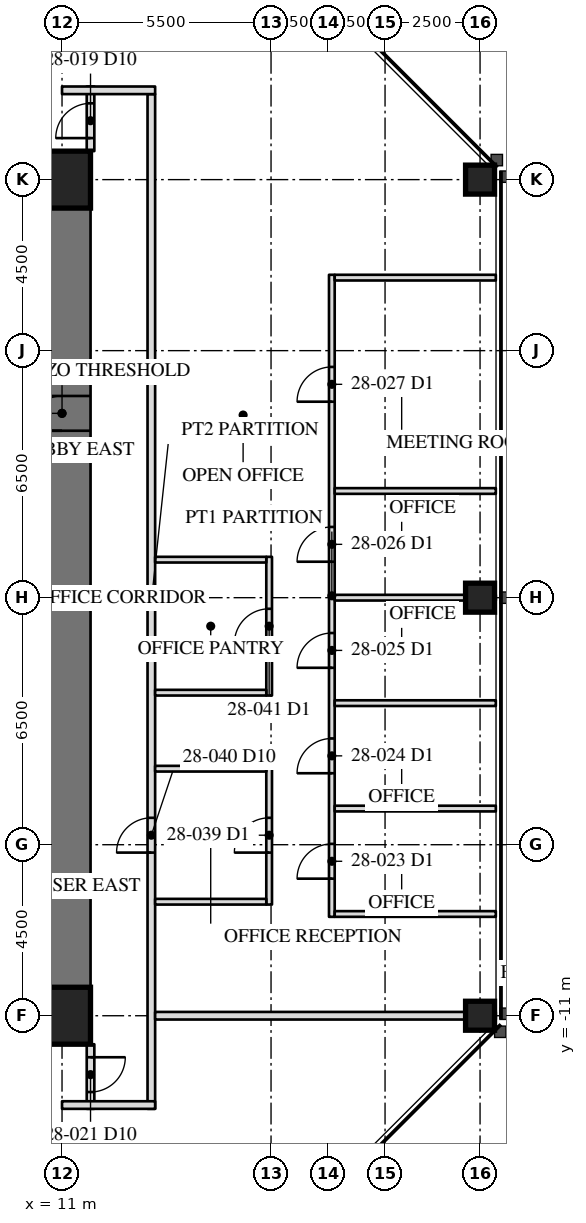
"""IFC4 building model, lengths in metres.
Left out: names, types, materials, properties, quantities, classifications, styles, units other than length and angle.
Written with IfcOpenShell. Run it as: python <this file> out.ifc"""

import sys

from ifc_helpers import new_model, si_unit, direction, frame, frame_2d, origin, origin_2d, place, context, subcontext, project, spatial, rectangle, hollow_rectangle, extrude, element, fill, save


model = new_model("IFC4")
c1 = context("Model", 3, precision=1e-05, world=origin(), true_north=direction((0.0, 1.0)))
c2 = subcontext(c1, "Body", "Model", "MODEL_VIEW")
j1 = project(units=[si_unit("LENGTHUNIT", "METRE"), si_unit("PLANEANGLEUNIT", "RADIAN")], contexts=[c1])
p1 = place(None, origin())
s1 = spatial("IfcSite", under=j1, at=p1, CompositionType="ELEMENT")
p2 = place(p1, origin())
s2 = spatial("IfcBuilding", under=s1, at=p2, CompositionType="ELEMENT")
p3 = place(p2, frame((0.0, 0.0, 121.3)))
s3 = spatial("IfcBuildingStorey", under=s2, at=p3, CompositionType="ELEMENT", Elevation=121.3)
for number, where, z_axis, x_axis in (
    (1, (22.0, -11.0, 0.0), (0.0, 0.0, 1.0), (0.0, 1.0, 0.0)),
    (2, (22.0, 0.0, 0.0), (0.0, 0.0, 1.0), (0.0, 1.0, 0.0)),
    (3, (22.0, 11.0, 0.0), (0.0, 0.0, 1.0), (0.0, 1.0, 0.0)),
):
    element("IfcColumn", number, at=place(p3, frame(where, z_axis=z_axis, x_axis=x_axis)), inside=s3, PredefinedType="COLUMN", context=c2, shape_type="SweptSolid", body=[
        extrude(hollow_rectangle(XDim=0.762, YDim=0.762, WallThickness=0.127, at=origin_2d()), origin(), (0.0, 0.0, 1.0), 4.1),
    ])
p4 = place(p3, frame((11.0, -11.0, 0.0), z_axis=(0.0, 0.0, 1.0), x_axis=(0.0, 1.0, 0.0)))
e4 = element("IfcWall", 4, at=p4, inside=s3, PredefinedType="SHEAR", context=c2, shape_type="SweptSolid", body=[
    extrude(rectangle(XDim=22.0, YDim=1.5, at=frame_2d((11.0, 0.0))), origin(), (0.0, 0.0, 1.0), 4.1),
])
p5 = place(p4, frame((15.393, 0.0, 0.0)))
e5 = element("IfcOpeningElement", 5, at=p5, cuts=e4, PredefinedType="OPENING", context=c2, shape_type="SweptSolid", body=[
    extrude(rectangle(XDim=0.915, YDim=2.134, at=frame_2d((0.458, 1.067))), frame((0.0, 0.76, 0.0), z_axis=(0.0, -1.0, 0.0), x_axis=(1.0, 0.0, 0.0)), (0.0, 0.0, 1.0), 1.52),
])
for number, where, z_axis, x_axis in (
    (6, (11.0, 11.0, 0.0), (0.0, 0.0, 1.0), (-1.0, 0.0, 0.0)),
    (7, (6.5, -11.0, 0.0), (0.0, 0.0, 1.0), (1.0, 0.0, 0.0)),
):
    element("IfcWall", number, at=place(p3, frame(where, z_axis=z_axis, x_axis=x_axis)), inside=s3, PredefinedType="SHEAR", context=c2, shape_type="SweptSolid", body=[
        extrude(rectangle(XDim=4.5, YDim=1.5, at=frame_2d((2.25, 0.0))), origin(), (0.0, 0.0, 1.0), 4.1),
    ])
for number, where, z_axis, x_axis in (
    (8, (11.0, 11.0, 0.0), (0.0, 0.0, 1.0), (1.0, 0.0, 0.0)),
    (9, (11.0, -11.0, 0.0), (0.0, 0.0, 1.0), (1.0, 0.0, 0.0)),
):
    element("IfcColumn", number, at=place(p3, frame(where, z_axis=z_axis, x_axis=x_axis)), inside=s3, PredefinedType="COLUMN", context=c2, shape_type="SweptSolid", body=[
        extrude(hollow_rectangle(XDim=1.499, YDim=1.499, WallThickness=0.102, at=origin_2d()), origin(), (0.0, 0.0, 1.0), 4.1),
    ])
p6 = place(p3, frame((13.35, -13.45, 0.0), z_axis=(0.0, 0.0, 1.0), x_axis=(0.0, 1.0, 0.0)))
e10 = element("IfcWall", 10, at=p6, inside=s3, PredefinedType="PARTITIONING", context=c2, shape_type="SweptSolid", body=[
    extrude(rectangle(XDim=26.7, YDim=0.2, at=frame_2d((13.35, 0.0))), origin(), (0.0, 0.0, 1.0), 3.91),
])
p7 = place(p6, frame((6.742, 0.0, 0.0)))
e11 = element("IfcOpeningElement", 11, at=p7, cuts=e10, PredefinedType="OPENING", context=c2, shape_type="SweptSolid", body=[
    extrude(rectangle(XDim=0.915, YDim=2.134, at=frame_2d((0.458, 1.067))), frame((0.0, 0.11, 0.0), z_axis=(0.0, -1.0, 0.0), x_axis=(1.0, 0.0, 0.0)), (0.0, 0.0, 1.0), 0.22),
])
p8 = place(p3, frame((11.75, 11.75, 0.0), z_axis=(0.0, 0.0, 1.0), x_axis=(0.0, 1.0, 0.0)))
e12 = element("IfcWall", 12, at=p8, inside=s3, PredefinedType="PARTITIONING", context=c2, shape_type="SweptSolid", body=[
    extrude(rectangle(XDim=1.7, YDim=0.2, at=frame_2d((0.85, 0.0))), origin(), (0.0, 0.0, 1.0), 3.91),
])
p9 = place(p8, frame((0.343, 0.0, 0.0)))
e13 = element("IfcOpeningElement", 13, at=p9, cuts=e12, PredefinedType="OPENING", context=c2, shape_type="SweptSolid", body=[
    extrude(rectangle(XDim=0.915, YDim=2.134, at=frame_2d((0.458, 1.067))), frame((0.0, 0.11, 0.0), z_axis=(0.0, -1.0, 0.0), x_axis=(1.0, 0.0, 0.0)), (0.0, 0.0, 1.0), 0.22),
])
p10 = place(p3, frame((11.0, 13.35, 0.0), z_axis=(0.0, 0.0, 1.0), x_axis=(1.0, 0.0, 0.0)))
e14 = element("IfcWall", 14, at=p10, inside=s3, PredefinedType="PARTITIONING", context=c2, shape_type="SweptSolid", body=[
    extrude(rectangle(XDim=2.45, YDim=0.2, at=frame_2d((1.225, 0.0))), origin(), (0.0, 0.0, 1.0), 3.91),
])
p11 = place(p3, frame((11.75, -11.75, 0.0), z_axis=(0.0, 0.0, 1.0), x_axis=(0.0, -1.0, 0.0)))
e15 = element("IfcWall", 15, at=p11, inside=s3, PredefinedType="PARTITIONING", context=c2, shape_type="SweptSolid", body=[
    extrude(rectangle(XDim=1.7, YDim=0.2, at=frame_2d((0.85, 0.0))), origin(), (0.0, 0.0, 1.0), 3.91),
])
p12 = place(p11, frame((0.343, 0.0, 0.0)))
e16 = element("IfcOpeningElement", 16, at=p12, cuts=e15, PredefinedType="OPENING", context=c2, shape_type="SweptSolid", body=[
    extrude(rectangle(XDim=0.915, YDim=2.134, at=frame_2d((0.458, 1.067))), frame((0.0, 0.11, 0.0), z_axis=(0.0, -1.0, 0.0), x_axis=(1.0, 0.0, 0.0)), (0.0, 0.0, 1.0), 0.22),
])
p13 = place(p3, frame((11.0, -13.35, 0.0), z_axis=(0.0, 0.0, 1.0), x_axis=(1.0, 0.0, 0.0)))
e17 = element("IfcWall", 17, at=p13, inside=s3, PredefinedType="PARTITIONING", context=c2, shape_type="SweptSolid", body=[
    extrude(rectangle(XDim=2.45, YDim=0.2, at=frame_2d((1.225, 0.0))), origin(), (0.0, 0.0, 1.0), 3.91),
])
p14 = place(p3, frame((13.45, -11.0, 0.0), z_axis=(0.0, 0.0, 1.0), x_axis=(1.0, 0.0, 0.0)))
e18 = element("IfcWall", 18, at=p14, inside=s3, PredefinedType="PARTITIONING", context=c2, shape_type="SweptSolid", body=[
    extrude(rectangle(XDim=8.965, YDim=0.2, at=frame_2d((4.482, 0.0))), origin(), (0.0, 0.0, 1.0), 3.326),
])
p15 = place(p3, frame((18.1, -8.398, 0.0), z_axis=(0.0, 0.0, 1.0), x_axis=(0.0, 1.0, 0.0)))
e19 = element("IfcWall", 19, at=p15, inside=s3, PredefinedType="PARTITIONING", context=c2, shape_type="SweptSolid", body=[
    extrude(rectangle(XDim=16.894, YDim=0.15, at=frame_2d((8.447, 0.0))), origin(), (0.0, 0.0, 1.0), 3.91),
])
p16 = place(p15, frame((1.004, 0.0, 0.0)))
e20 = element("IfcOpeningElement", 20, at=p16, cuts=e19, PredefinedType="OPENING", context=c2, shape_type="SweptSolid", body=[
    extrude(rectangle(XDim=0.915, YDim=2.134, at=frame_2d((0.458, 1.067))), frame((0.0, 0.085, 0.0), z_axis=(0.0, -1.0, 0.0), x_axis=(1.0, 0.0, 0.0)), (0.0, 0.0, 1.0), 0.17),
])
p17 = place(p15, frame((3.779, 0.0, 0.0)))
e21 = element("IfcOpeningElement", 21, at=p17, cuts=e19, PredefinedType="OPENING", context=c2, shape_type="SweptSolid", body=[
    extrude(rectangle(XDim=0.915, YDim=2.134, at=frame_2d((0.458, 1.067))), frame((0.0, 0.085, 0.0), z_axis=(0.0, -1.0, 0.0), x_axis=(1.0, 0.0, 0.0)), (0.0, 0.0, 1.0), 0.17),
])
p18 = place(p15, frame((6.553, 0.0, 0.0)))
e22 = element("IfcOpeningElement", 22, at=p18, cuts=e19, PredefinedType="OPENING", context=c2, shape_type="SweptSolid", body=[
    extrude(rectangle(XDim=0.915, YDim=2.134, at=frame_2d((0.458, 1.067))), frame((0.0, 0.085, 0.0), z_axis=(0.0, -1.0, 0.0), x_axis=(1.0, 0.0, 0.0)), (0.0, 0.0, 1.0), 0.17),
])
p19 = place(p15, frame((9.344, 0.0, 0.0)))
e23 = element("IfcOpeningElement", 23, at=p19, cuts=e19, PredefinedType="OPENING", context=c2, shape_type="SweptSolid", body=[
    extrude(rectangle(XDim=0.915, YDim=2.134, at=frame_2d((0.458, 1.067))), frame((0.0, 0.085, 0.0), z_axis=(0.0, -1.0, 0.0), x_axis=(1.0, 0.0, 0.0)), (0.0, 0.0, 1.0), 0.17),
])
p20 = place(p15, frame((13.554, 0.0, 0.0)))
e24 = element("IfcOpeningElement", 24, at=p20, cuts=e19, PredefinedType="OPENING", context=c2, shape_type="SweptSolid", body=[
    extrude(rectangle(XDim=0.915, YDim=2.134, at=frame_2d((0.458, 1.067))), frame((0.0, 0.085, 0.0), z_axis=(0.0, -1.0, 0.0), x_axis=(1.0, 0.0, 0.0)), (0.0, 0.0, 1.0), 0.17),
])
for number, where, z_axis, x_axis in (
    (25, (18.175, -8.323, 0.0), (0.0, 0.0, 1.0), (1.0, 0.0, 0.0)),
    (26, (18.175, -5.549, 0.0), (0.0, 0.0, 1.0), (1.0, 0.0, 0.0)),
    (27, (18.175, -2.775, 0.0), (0.0, 0.0, 1.0), (1.0, 0.0, 0.0)),
):
    element("IfcWall", number, at=place(p3, frame(where, z_axis=z_axis, x_axis=x_axis)), inside=s3, PredefinedType="PARTITIONING", context=c2, shape_type="SweptSolid", body=[
        extrude(rectangle(XDim=4.24, YDim=0.15, at=frame_2d((2.12, 0.0))), origin(), (0.0, 0.0, 1.0), 3.91),
    ])
p21 = place(p3, frame((18.175, 0.0, 0.0), z_axis=(0.0, 0.0, 1.0), x_axis=(1.0, 0.0, 0.0)))
e28 = element("IfcWall", 28, at=p21, inside=s3, PredefinedType="PARTITIONING", context=c2, shape_type="SweptSolid", body=[
    extrude(rectangle(XDim=4.24, YDim=0.15, at=frame_2d((2.12, 0.0))), origin(), (0.0, 0.0, 1.0), 3.326),
])
for number, where, z_axis, x_axis in (
    (29, (18.175, 2.807, 0.0), (0.0, 0.0, 1.0), (1.0, 0.0, 0.0)),
    (30, (18.175, 8.421, 0.0), (0.0, 0.0, 1.0), (1.0, 0.0, 0.0)),
):
    element("IfcWall", number, at=place(p3, frame(where, z_axis=z_axis, x_axis=x_axis)), inside=s3, PredefinedType="PARTITIONING", context=c2, shape_type="SweptSolid", body=[
        extrude(rectangle(XDim=4.24, YDim=0.15, at=frame_2d((2.12, 0.0))), origin(), (0.0, 0.0, 1.0), 3.91),
    ])
p22 = place(p3, frame((16.45, -8.075, 0.0), z_axis=(0.0, 0.0, 1.0), x_axis=(0.0, 1.0, 0.0)))
e31 = element("IfcWall", 31, at=p22, inside=s3, PredefinedType="PARTITIONING", context=c2, shape_type="SweptSolid", body=[
    extrude(rectangle(XDim=3.65, YDim=0.15, at=frame_2d((1.825, 0.0))), origin(), (0.0, 0.0, 1.0), 3.91),
])
p23 = place(p22, frame((1.367, 0.0, 0.0)))
e32 = element("IfcOpeningElement", 32, at=p23, cuts=e31, PredefinedType="OPENING", context=c2, shape_type="SweptSolid", body=[
    extrude(rectangle(XDim=0.915, YDim=2.134, at=frame_2d((0.458, 1.067))), frame((0.0, 0.085, 0.0), z_axis=(0.0, -1.0, 0.0), x_axis=(1.0, 0.0, 0.0)), (0.0, 0.0, 1.0), 0.17),
])
for number, where, z_axis, x_axis in (
    (33, (16.375, -8.0, 0.0), (0.0, 0.0, 1.0), (-1.0, 0.0, 0.0)),
    (34, (16.375, -4.5, 0.0), (0.0, 0.0, 1.0), (-1.0, 0.0, 0.0)),
):
    element("IfcWall", number, at=place(p3, frame(where, z_axis=z_axis, x_axis=x_axis)), inside=s3, PredefinedType="PARTITIONING", context=c2, shape_type="SweptSolid", body=[
        extrude(rectangle(XDim=2.925, YDim=0.15, at=frame_2d((1.462, 0.0))), origin(), (0.0, 0.0, 1.0), 3.91),
    ])
p24 = place(p3, frame((16.45, -2.575, 0.0), z_axis=(0.0, 0.0, 1.0), x_axis=(0.0, 1.0, 0.0)))
e35 = element("IfcWall", 35, at=p24, inside=s3, PredefinedType="PARTITIONING", context=c2, shape_type="SweptSolid", body=[
    extrude(rectangle(XDim=3.65, YDim=0.15, at=frame_2d((1.825, 0.0))), origin(), (0.0, 0.0, 1.0), 3.91),
])
p25 = place(p24, frame((1.367, 0.0, 0.0)))
e36 = element("IfcOpeningElement", 36, at=p25, cuts=e35, PredefinedType="OPENING", context=c2, shape_type="SweptSolid", body=[
    extrude(rectangle(XDim=0.915, YDim=2.134, at=frame_2d((0.458, 1.067))), frame((0.0, 0.085, 0.0), z_axis=(0.0, -1.0, 0.0), x_axis=(1.0, 0.0, 0.0)), (0.0, 0.0, 1.0), 0.17),
])
for number, where, z_axis, x_axis in (
    (37, (16.375, -2.5, 0.0), (0.0, 0.0, 1.0), (-1.0, 0.0, 0.0)),
    (38, (16.375, 1.0, 0.0), (0.0, 0.0, 1.0), (-1.0, 0.0, 0.0)),
):
    element("IfcWall", number, at=place(p3, frame(where, z_axis=z_axis, x_axis=x_axis)), inside=s3, PredefinedType="PARTITIONING", context=c2, shape_type="SweptSolid", body=[
        extrude(rectangle(XDim=2.925, YDim=0.15, at=frame_2d((1.462, 0.0))), origin(), (0.0, 0.0, 1.0), 3.91),
    ])
p26 = place(p5, origin())
e39 = element("IfcDoor", 39, at=p26, inside=s3, OperationType="SINGLE_SWING_RIGHT", PredefinedType="DOOR", context=c2, shape_type="SweptSolid", body=[
    extrude(rectangle(XDim=0.915, YDim=2.134, at=frame_2d((0.458, 1.067))), frame((0.0, -0.675, 0.0), z_axis=(0.0, -1.0, 0.0), x_axis=(1.0, 0.0, 0.0)), (0.0, 0.0, 1.0), 0.05),
])
fill(e5, e39)
p27 = place(p9, origin())
e40 = element("IfcDoor", 40, at=p27, inside=s3, OperationType="SINGLE_SWING_LEFT", PredefinedType="DOOR", context=c2, shape_type="SweptSolid", body=[
    extrude(rectangle(XDim=0.915, YDim=2.134, at=frame_2d((0.458, 1.067))), frame((0.0, 0.025, 0.0), z_axis=(0.0, -1.0, 0.0), x_axis=(1.0, 0.0, 0.0)), (0.0, 0.0, 1.0), 0.05),
])
fill(e13, e40)
p28 = place(p12, origin())
e41 = element("IfcDoor", 41, at=p28, inside=s3, OperationType="SINGLE_SWING_LEFT", PredefinedType="DOOR", context=c2, shape_type="SweptSolid", body=[
    extrude(rectangle(XDim=0.915, YDim=2.134, at=frame_2d((0.458, 1.067))), frame((0.0, 0.025, 0.0), z_axis=(0.0, -1.0, 0.0), x_axis=(1.0, 0.0, 0.0)), (0.0, 0.0, 1.0), 0.05),
])
fill(e16, e41)
p29 = place(p16, origin())
e42 = element("IfcDoor", 42, at=p29, inside=s3, OperationType="SINGLE_SWING_LEFT", PredefinedType="DOOR", context=c2, shape_type="SweptSolid", body=[
    extrude(rectangle(XDim=0.915, YDim=2.134, at=frame_2d((0.458, 1.067))), frame((0.0, 0.025, 0.0), z_axis=(0.0, -1.0, 0.0), x_axis=(1.0, 0.0, 0.0)), (0.0, 0.0, 1.0), 0.05),
])
fill(e20, e42)
p30 = place(p17, origin())
e43 = element("IfcDoor", 43, at=p30, inside=s3, OperationType="SINGLE_SWING_LEFT", PredefinedType="DOOR", context=c2, shape_type="SweptSolid", body=[
    extrude(rectangle(XDim=0.915, YDim=2.134, at=frame_2d((0.458, 1.067))), frame((0.0, 0.025, 0.0), z_axis=(0.0, -1.0, 0.0), x_axis=(1.0, 0.0, 0.0)), (0.0, 0.0, 1.0), 0.05),
])
fill(e21, e43)
p31 = place(p18, origin())
e44 = element("IfcDoor", 44, at=p31, inside=s3, OperationType="SINGLE_SWING_LEFT", PredefinedType="DOOR", context=c2, shape_type="SweptSolid", body=[
    extrude(rectangle(XDim=0.915, YDim=2.134, at=frame_2d((0.458, 1.067))), frame((0.0, 0.025, 0.0), z_axis=(0.0, -1.0, 0.0), x_axis=(1.0, 0.0, 0.0)), (0.0, 0.0, 1.0), 0.05),
])
fill(e22, e44)
p32 = place(p19, origin())
e45 = element("IfcDoor", 45, at=p32, inside=s3, OperationType="SINGLE_SWING_LEFT", PredefinedType="DOOR", context=c2, shape_type="SweptSolid", body=[
    extrude(rectangle(XDim=0.915, YDim=2.134, at=frame_2d((0.458, 1.067))), frame((0.0, 0.025, 0.0), z_axis=(0.0, -1.0, 0.0), x_axis=(1.0, 0.0, 0.0)), (0.0, 0.0, 1.0), 0.05),
])
fill(e23, e45)
p33 = place(p20, origin())
e46 = element("IfcDoor", 46, at=p33, inside=s3, OperationType="SINGLE_SWING_LEFT", PredefinedType="DOOR", context=c2, shape_type="SweptSolid", body=[
    extrude(rectangle(XDim=0.915, YDim=2.134, at=frame_2d((0.458, 1.067))), frame((0.0, 0.025, 0.0), z_axis=(0.0, -1.0, 0.0), x_axis=(1.0, 0.0, 0.0)), (0.0, 0.0, 1.0), 0.05),
])
fill(e24, e46)
p34 = place(p23, origin())
e47 = element("IfcDoor", 47, at=p34, inside=s3, OperationType="SINGLE_SWING_LEFT", PredefinedType="DOOR", context=c2, shape_type="SweptSolid", body=[
    extrude(rectangle(XDim=0.915, YDim=2.134, at=frame_2d((0.458, 1.067))), frame((0.0, 0.025, 0.0), z_axis=(0.0, -1.0, 0.0), x_axis=(1.0, 0.0, 0.0)), (0.0, 0.0, 1.0), 0.05),
])
fill(e32, e47)
p35 = place(p7, origin())
e48 = element("IfcDoor", 48, at=p35, inside=s3, OperationType="SINGLE_SWING_LEFT", PredefinedType="DOOR", context=c2, shape_type="SweptSolid", body=[
    extrude(rectangle(XDim=0.915, YDim=2.134, at=frame_2d((0.458, 1.067))), frame((0.0, 0.025, 0.0), z_axis=(0.0, -1.0, 0.0), x_axis=(1.0, 0.0, 0.0)), (0.0, 0.0, 1.0), 0.05),
])
fill(e11, e48)
p36 = place(p25, origin())
e49 = element("IfcDoor", 49, at=p36, inside=s3, OperationType="SINGLE_SWING_LEFT", PredefinedType="DOOR", context=c2, shape_type="SweptSolid", body=[
    extrude(rectangle(XDim=0.915, YDim=2.134, at=frame_2d((0.458, 1.067))), frame((0.0, 0.025, 0.0), z_axis=(0.0, -1.0, 0.0), x_axis=(1.0, 0.0, 0.0)), (0.0, 0.0, 1.0), 0.05),
])
fill(e36, e49)
save(model, sys.argv[1])
